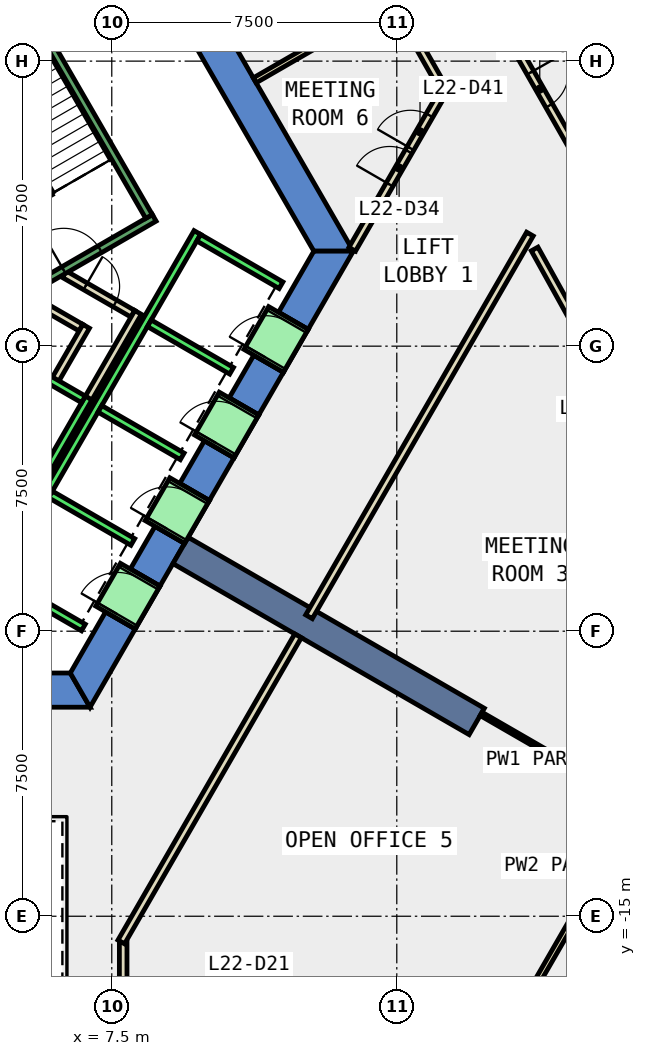
"""IFC4 building model, lengths in metres.
Left out: names, types, materials, properties, quantities, classifications, styles, units other than length and angle.
Written with IfcOpenShell. Run it as: python <this file> out.ifc"""

import sys

from ifc_helpers import new_model, si_unit, direction, frame, frame_2d, origin, place, context, subcontext, project, spatial, polyline, rectangle, outline, extrude, element, fill, save


model = new_model("IFC4")
c1 = context("Model", 3, precision=1e-05, world=origin(), true_north=direction((0.0, 1.0)))
c2 = subcontext(c1, "Body", "Model", "MODEL_VIEW")
j1 = project(units=[si_unit("LENGTHUNIT", "METRE"), si_unit("PLANEANGLEUNIT", "RADIAN")], contexts=[c1])
p1 = place(None, origin())
s1 = spatial("IfcSite", under=j1, at=p1, CompositionType="ELEMENT")
p2 = place(p1, origin())
s2 = spatial("IfcBuilding", under=s1, at=p2, CompositionType="ELEMENT")
p3 = place(p2, frame((0.0, 0.0, 103.4)))
s3 = spatial("IfcBuildingStorey", under=s2, at=p3, CompositionType="ELEMENT", Elevation=103.4)
p4 = place(p3, frame((0.0, 0.0, -0.4)))
e1 = element("IfcWall", 1, at=p4, inside=s3, PredefinedType="SHEAR", context=c2, shape_type="SweptSolid", body=[
    extrude(outline(polyline([(8.517, 11.748), (7.738, 11.298), (12.817, 2.5), (13.856, 2.5), (8.517, 11.748)])), origin(), (0.0, 0.0, 1.0), 4.2),
])
p5 = place(p3, frame((0.0, 0.0, -0.4)))
e2 = element("IfcWall", 2, at=p5, inside=s3, PredefinedType="SHEAR", context=c2, shape_type="SweptSolid", body=[
    extrude(outline(polyline([(5.75, -8.6), (5.75, -9.5), (6.928, -9.5), (6.409, -8.6), (5.75, -8.6)])), origin(), (0.0, 0.0, 1.0), 4.2),
])
p6 = place(p3, frame((0.0, 0.0, -0.4)))
e3 = element("IfcWall", 3, at=p6, inside=s3, PredefinedType="SHEAR", context=c2, shape_type="SweptSolid", body=[
    extrude(outline(polyline([(8.117, -7.44), (7.338, -6.99), (6.409, -8.6), (6.928, -9.5), (8.117, -7.44)])), origin(), (0.0, 0.0, 1.0), 4.2),
])
p7 = place(p3, frame((0.0, 0.0, -0.4)))
e4 = element("IfcWall", 4, at=p7, inside=s3, PredefinedType="SHEAR", context=c2, shape_type="SweptSolid", body=[
    extrude(outline(polyline([(9.417, -5.189), (8.638, -4.739), (7.988, -5.864), (8.767, -6.314), (9.417, -5.189)])), origin(), (0.0, 0.0, 1.0), 4.2),
])
p8 = place(p3, frame((0.0, 0.0, -0.4)))
e5 = element("IfcWall", 5, at=p8, inside=s3, PredefinedType="SHEAR", context=c2, shape_type="SweptSolid", body=[
    extrude(outline(polyline([(10.717, -2.937), (9.938, -2.487), (9.288, -3.613), (10.067, -4.063), (10.717, -2.937)])), origin(), (0.0, 0.0, 1.0), 4.2),
])
p9 = place(p3, frame((0.0, 0.0, -0.4)))
e6 = element("IfcWall", 6, at=p9, inside=s3, PredefinedType="SHEAR", context=c2, shape_type="SweptSolid", body=[
    extrude(outline(polyline([(12.017, -0.686), (11.238, -0.236), (10.588, -1.361), (11.367, -1.811), (12.017, -0.686)])), origin(), (0.0, 0.0, 1.0), 4.2),
])
p10 = place(p3, frame((0.0, 0.0, -0.4)))
e7 = element("IfcWall", 7, at=p10, inside=s3, PredefinedType="SHEAR", context=c2, shape_type="SweptSolid", body=[
    extrude(outline(polyline([(11.888, 0.89), (12.667, 0.44), (13.856, 2.5), (12.817, 2.5), (11.888, 0.89)])), origin(), (0.0, 0.0, 1.0), 4.2),
])
p11 = place(p3, frame((0.0, 0.0, 3.6)))
e8 = element("IfcWall", 8, at=p11, inside=s3, PredefinedType="SHEAR", context=c2, shape_type="SweptSolid", body=[
    extrude(outline(polyline([(8.767, -6.314), (7.988, -5.864), (7.338, -6.99), (8.117, -7.44), (8.767, -6.314)])), origin(), (0.0, 0.0, 1.0), 0.2),
])
p12 = place(p3, frame((0.0, 0.0, 3.6)))
e9 = element("IfcWall", 9, at=p12, inside=s3, PredefinedType="SHEAR", context=c2, shape_type="SweptSolid", body=[
    extrude(outline(polyline([(10.067, -4.063), (9.288, -3.613), (8.638, -4.739), (9.417, -5.189), (10.067, -4.063)])), origin(), (0.0, 0.0, 1.0), 0.2),
])
p13 = place(p3, frame((0.0, 0.0, 3.6)))
e10 = element("IfcWall", 10, at=p13, inside=s3, PredefinedType="SHEAR", context=c2, shape_type="SweptSolid", body=[
    extrude(outline(polyline([(11.367, -1.811), (10.588, -1.361), (9.938, -2.487), (10.717, -2.937), (11.367, -1.811)])), origin(), (0.0, 0.0, 1.0), 0.2),
])
p14 = place(p3, frame((0.0, 0.0, 3.6)))
e11 = element("IfcWall", 11, at=p14, inside=s3, PredefinedType="SHEAR", context=c2, shape_type="SweptSolid", body=[
    extrude(outline(polyline([(12.667, 0.44), (11.888, 0.89), (11.238, -0.236), (12.017, -0.686), (12.667, 0.44)])), origin(), (0.0, 0.0, 1.0), 0.2),
])
p15 = place(p3, frame((9.31, -5.375, -0.4), z_axis=(0.0, 0.0, 1.0), x_axis=(0.866017533419, -0.500013631625, 0.0)))
e12 = element("IfcWall", 12, at=p15, inside=s3, PredefinedType="SHEAR", context=c2, shape_type="SweptSolid", body=[
    extrude(rectangle(XDim=9.0, YDim=0.8, at=frame_2d((4.5, 0.0))), origin(), (0.0, 0.0, 1.0), 4.2),
])
p16 = place(p3, frame((16.195, 6.824, 0.0), z_axis=(0.0, 0.0, 1.0), x_axis=(-0.494984897559, 0.868901577388, 0.0)))
e13 = element("IfcWall", 13, at=p16, inside=s3, PredefinedType="PARTITIONING", context=c2, shape_type="SweptSolid", body=[
    extrude(rectangle(XDim=2.188, YDim=0.2, at=frame_2d((1.094, 0.0))), origin(), (0.0, 0.0, 1.0), 3.8),
])
p17 = place(p3, frame((22.071, -3.65, 0.0), z_axis=(0.0, 0.0, 1.0), x_axis=(-0.485198988697, 0.874403763354, 0.0)))
e14 = element("IfcWall", 14, at=p17, inside=s3, PredefinedType="PARTITIONING", context=c2, shape_type="SweptSolid", body=[
    extrude(rectangle(XDim=7.098, YDim=0.2, at=frame_2d((3.549, 0.0))), origin(), (0.0, 0.0, 1.0), 3.8),
])
p18 = place(p17, frame((3.049, 0.0, 0.0)))
e15 = element("IfcOpeningElement", 15, at=p18, cuts=e14, PredefinedType="OPENING", context=c2, shape_type="SweptSolid", body=[
    extrude(rectangle(XDim=1.0, YDim=2.1, at=frame_2d((0.5, 1.05))), frame((0.0, 0.11, 0.0), z_axis=(0.0, -1.0, 0.0), x_axis=(1.0, 0.0, 0.0)), (0.0, 0.0, 1.0), 0.22),
])
p19 = place(p3, frame((16.98, 9.89, 0.0), z_axis=(0.0, 0.0, 1.0), x_axis=(0.495123170501, -0.868822793228, 0.0)))
e16 = element("IfcWall", 16, at=p19, inside=s3, PredefinedType="PARTITIONING", context=c2, shape_type="SweptSolid", body=[
    extrude(rectangle(XDim=7.198, YDim=0.2, at=frame_2d((3.599, 0.0))), origin(), (0.0, 0.0, 1.0), 3.8),
])
p20 = place(p19, frame((3.099, 0.0, 0.0)))
e17 = element("IfcOpeningElement", 17, at=p20, cuts=e16, PredefinedType="OPENING", context=c2, shape_type="SweptSolid", body=[
    extrude(rectangle(XDim=1.0, YDim=2.1, at=frame_2d((0.5, 1.05))), frame((0.0, 0.11, 0.0), z_axis=(0.0, -1.0, 0.0), x_axis=(1.0, 0.0, 0.0)), (0.0, 0.0, 1.0), 0.22),
])
p21 = place(p3, frame((5.499, 1.172, 0.0), z_axis=(0.0, 0.0, 1.0), x_axis=(0.866333505267, -0.499465972466, 0.0)))
e18 = element("IfcWall", 18, at=p21, inside=s3, PredefinedType="PARTITIONING", context=c2, shape_type="SweptSolid", body=[
    extrude(rectangle(XDim=1.374, YDim=0.2, at=frame_2d((0.687, 0.0))), origin(), (0.0, 0.0, 1.0), 3.8),
])
p22 = place(p3, frame((6.826, 0.522, 0.0), z_axis=(0.0, 0.0, 1.0), x_axis=(-0.500016722714, -0.866015748706, 0.0)))
e19 = element("IfcWall", 19, at=p22, inside=s3, PredefinedType="PARTITIONING", context=c2, shape_type="SweptSolid", body=[
    extrude(rectangle(XDim=1.7, YDim=0.2, at=frame_2d((0.85, 0.0))), origin(), (0.0, 0.0, 1.0), 3.8),
])
p23 = place(p3, frame((6.25, 1.894, 0.0), z_axis=(0.0, 0.0, 1.0), x_axis=(0.866043184279, -0.499969202016, 0.0)))
e20 = element("IfcWall", 20, at=p23, inside=s3, PredefinedType="PARTITIONING", context=c2, shape_type="SweptSolid", body=[
    extrude(rectangle(XDim=2.084, YDim=0.2, at=frame_2d((1.042, 0.0))), origin(), (0.0, 0.0, 1.0), 3.8),
])
p24 = place(p23, frame((0.642, 0.0, 0.0)))
e21 = element("IfcOpeningElement", 21, at=p24, cuts=e20, PredefinedType="OPENING", context=c2, shape_type="SweptSolid", body=[
    extrude(rectangle(XDim=0.9, YDim=2.1, at=frame_2d((0.45, 1.05))), frame((0.0, 0.11, 0.0), z_axis=(0.0, -1.0, 0.0), x_axis=(1.0, 0.0, 0.0)), (0.0, 0.0, 1.0), 0.22),
])
p25 = place(p3, frame((8.192, 0.888, 0.0), z_axis=(0.0, 0.0, 1.0), x_axis=(-0.499940625693, -0.866059680843, 0.0)))
e22 = element("IfcWall", 22, at=p25, inside=s3, PredefinedType="PARTITIONING", context=c2, shape_type="SweptSolid", body=[
    extrude(rectangle(XDim=2.68, YDim=0.2, at=frame_2d((1.34, 0.0))), origin(), (0.0, 0.0, 1.0), 3.8),
])
p26 = place(p3, frame((11.261, 6.994, 0.0), z_axis=(0.0, 0.0, 1.0), x_axis=(0.866037428454, 0.499979172084, 0.0)))
e23 = element("IfcWall", 23, at=p26, inside=s3, PredefinedType="PARTITIONING", context=c2, shape_type="SweptSolid", body=[
    extrude(rectangle(XDim=4.198, YDim=0.15, at=frame_2d((2.099, 0.0))), origin(), (0.0, 0.0, 1.0), 3.8),
])
p27 = place(p3, frame((13.827, 2.55, 0.0), z_axis=(0.0, 0.0, 1.0), x_axis=(0.500070719615, 0.865984569946, 0.0)))
e24 = element("IfcWall", 24, at=p27, inside=s3, PredefinedType="PARTITIONING", context=c2, shape_type="SweptSolid", body=[
    extrude(rectangle(XDim=4.935, YDim=0.2, at=frame_2d((2.468, 0.0))), origin(), (0.0, 0.0, 1.0), 3.8),
])
p28 = place(p27, frame((1.968, 0.0, 0.0)))
e25 = element("IfcOpeningElement", 25, at=p28, cuts=e24, PredefinedType="OPENING", context=c2, shape_type="SweptSolid", body=[
    extrude(rectangle(XDim=1.0, YDim=2.1, at=frame_2d((0.5, 1.05))), frame((0.0, 0.11, 0.0), z_axis=(0.0, -1.0, 0.0), x_axis=(1.0, 0.0, 0.0)), (0.0, 0.0, 1.0), 0.22),
])
p29 = place(p27, frame((3.068, 0.0, 0.0)))
e26 = element("IfcOpeningElement", 26, at=p29, cuts=e24, PredefinedType="OPENING", context=c2, shape_type="SweptSolid", body=[
    extrude(rectangle(XDim=1.0, YDim=2.1, at=frame_2d((0.5, 1.05))), frame((0.0, 0.11, 0.0), z_axis=(0.0, -1.0, 0.0), x_axis=(1.0, 0.0, 0.0)), (0.0, 0.0, 1.0), 0.22),
])
p30 = place(p3, frame((7.8, -15.69, 0.0), z_axis=(0.0, 0.0, 1.0), x_axis=(0.0, -1.0, 0.0)))
e27 = element("IfcWall", 27, at=p30, inside=s3, PredefinedType="PARTITIONING", context=c2, shape_type="SweptSolid", body=[
    extrude(rectangle(XDim=1.7, YDim=0.2, at=frame_2d((0.85, 0.0))), origin(), (0.0, 0.0, 1.0), 3.8),
])
p31 = place(p3, frame((12.401, -7.621, 0.0), z_axis=(0.0, 0.0, 1.0), x_axis=(-0.499983724212, -0.866034800411, 0.0)))
e28 = element("IfcWall", 28, at=p31, inside=s3, PredefinedType="PARTITIONING", context=c2, shape_type="SweptSolid", body=[
    extrude(rectangle(XDim=9.302, YDim=0.2, at=frame_2d((4.651, 0.0))), origin(), (0.0, 0.0, 1.0), 3.8),
])
p32 = place(p3, frame((18.503, 2.949, 0.0), z_axis=(0.0, 0.0, 1.0), x_axis=(-0.49997390151, -0.86604047123, 0.0)))
e29 = element("IfcWall", 29, at=p32, inside=s3, PredefinedType="PARTITIONING", context=c2, shape_type="SweptSolid", body=[
    extrude(rectangle(XDim=11.626, YDim=0.2, at=frame_2d((5.813, 0.0))), origin(), (0.0, 0.0, 1.0), 3.8),
])
p33 = place(p3, frame((17.219, -9.676, 0.0), z_axis=(0.0, 0.0, 1.0), x_axis=(0.86598459596, -0.500070674565, 0.0)))
e30 = element("IfcWall", 30, at=p33, inside=s3, PredefinedType="PARTITIONING", context=c2, shape_type="SweptSolid", body=[
    extrude(rectangle(XDim=4.875, YDim=0.1, at=frame_2d((2.438, 0.0))), origin(), (0.0, 0.0, 1.0), 3.8),
])
p34 = place(p3, frame((21.236, -12.319, 0.0), z_axis=(0.0, 0.0, 1.0), x_axis=(-0.500016488359, -0.866015884017, 0.0)))
e31 = element("IfcWall", 31, at=p34, inside=s3, PredefinedType="PARTITIONING", context=c2, shape_type="SweptSolid", body=[
    extrude(rectangle(XDim=5.702, YDim=0.15, at=frame_2d((2.851, 0.0))), origin(), (0.0, 0.0, 1.0), 3.8),
])
p35 = place(p3, frame((5.492, -3.788, 0.0), z_axis=(0.0, 0.0, 1.0), x_axis=(0.500011755427, 0.866018616679, 0.0)))
e32 = element("IfcWall", 32, at=p35, inside=s3, PredefinedType="STANDARD", context=c2, shape_type="SweptSolid", body=[
    extrude(rectangle(XDim=2.8, YDim=0.2, at=frame_2d((1.4, 0.0))), origin(), (0.0, 0.0, 1.0), 3.8),
])
p36 = place(p3, frame((4.677, -0.2, 0.0), z_axis=(0.0, 0.0, 1.0), x_axis=(0.865973769406, -0.500089422704, 0.0)))
e33 = element("IfcWall", 33, at=p36, inside=s3, PredefinedType="STANDARD", context=c2, shape_type="SweptSolid", body=[
    extrude(rectangle(XDim=2.399, YDim=0.2, at=frame_2d((1.2, 0.0))), origin(), (0.0, 0.0, 1.0), 3.8),
])
p37 = place(p3, frame((4.451, -6.19, 0.0), z_axis=(0.0, 0.0, 1.0), x_axis=(0.50000090737, 0.866024879913, 0.0)))
e34 = element("IfcWall", 34, at=p37, inside=s3, PredefinedType="STANDARD", context=c2, shape_type="SweptSolid", body=[
    extrude(rectangle(XDim=10.6, YDim=0.2, at=frame_2d((5.3, 0.0))), origin(), (0.0, 0.0, 1.0), 3.8),
])
for number, where, z_axis, x_axis in (
    (35, (4.588, -6.153, 0.0), (0.0, 0.0, 1.0), (0.866, -0.5, 0.0)),
    (36, (5.888, -3.902, 0.0), (0.0, 0.0, 1.0), (0.866, -0.5, 0.0)),
    (37, (7.188, -1.65, 0.0), (0.0, 0.0, 1.0), (0.866, -0.5, 0.0)),
    (38, (8.488, 0.602, 0.0), (0.0, 0.0, 1.0), (0.866, -0.5, 0.0)),
):
    element("IfcWall", number, at=place(p3, frame(where, z_axis=z_axis, x_axis=x_axis)), inside=s3, PredefinedType="STANDARD", context=c2, shape_type="SweptSolid", body=[
        extrude(rectangle(XDim=2.5, YDim=0.2, at=frame_2d((1.25, 0.0))), origin(), (0.0, 0.0, 1.0), 3.8),
    ])
p38 = place(p3, frame((9.788, 2.853, 0.0), z_axis=(0.0, 0.0, 1.0), x_axis=(0.865998541277, -0.500046524342, 0.0)))
e39 = element("IfcWall", 39, at=p38, inside=s3, PredefinedType="STANDARD", context=c2, shape_type="SweptSolid", body=[
    extrude(rectangle(XDim=2.5, YDim=0.2, at=frame_2d((1.25, 0.0))), origin(), (0.0, 0.0, 1.0), 3.8),
])
p39 = place(p3, frame((7.598, -7.14, 0.0), z_axis=(0.0, 0.0, 1.0), x_axis=(0.500362116554, 0.865816234728, 0.0)))
e40 = element("IfcWall", 40, at=p39, inside=s3, PredefinedType="STANDARD", context=c2, shape_type="SweptSolid", body=[
    extrude(rectangle(XDim=1.299, YDim=1.2, at=frame_2d((0.65, 0.0))), origin(), (0.0, 0.0, 1.0), 2.4),
])
p40 = place(p39, frame((0.1, 0.0, 0.0)))
e41 = element("IfcOpeningElement", 41, at=p40, cuts=e40, PredefinedType="OPENING", context=c2, shape_type="SweptSolid", body=[
    extrude(rectangle(XDim=1.1, YDim=2.3, at=frame_2d((0.55, 1.15))), frame((0.0, 0.61, 0.0), z_axis=(0.0, -1.0, 0.0), x_axis=(1.0, 0.0, 0.0)), (0.0, 0.0, 1.0), 1.22),
])
p41 = place(p3, frame((8.898, -4.889, 0.0), z_axis=(0.0, 0.0, 1.0), x_axis=(0.500036693733, 0.866004217611, 0.0)))
e42 = element("IfcWall", 42, at=p41, inside=s3, PredefinedType="STANDARD", context=c2, shape_type="SweptSolid", body=[
    extrude(rectangle(XDim=1.3, YDim=1.2, at=frame_2d((0.65, 0.0))), origin(), (0.0, 0.0, 1.0), 2.4),
])
p42 = place(p41, frame((0.1, 0.0, 0.0)))
e43 = element("IfcOpeningElement", 43, at=p42, cuts=e42, PredefinedType="OPENING", context=c2, shape_type="SweptSolid", body=[
    extrude(rectangle(XDim=1.1, YDim=2.3, at=frame_2d((0.55, 1.15))), frame((0.0, 0.61, 0.0), z_axis=(0.0, -1.0, 0.0), x_axis=(1.0, 0.0, 0.0)), (0.0, 0.0, 1.0), 1.22),
])
p43 = place(p3, frame((10.198, -2.637, 0.0), z_axis=(0.0, 0.0, 1.0), x_axis=(0.49989585183, 0.866085525409, 0.0)))
e44 = element("IfcWall", 44, at=p43, inside=s3, PredefinedType="STANDARD", context=c2, shape_type="SweptSolid", body=[
    extrude(rectangle(XDim=1.3, YDim=1.2, at=frame_2d((0.65, 0.0))), origin(), (0.0, 0.0, 1.0), 2.4),
])
p44 = place(p43, frame((0.1, 0.0, 0.0)))
e45 = element("IfcOpeningElement", 45, at=p44, cuts=e44, PredefinedType="OPENING", context=c2, shape_type="SweptSolid", body=[
    extrude(rectangle(XDim=1.1, YDim=2.3, at=frame_2d((0.55, 1.15))), frame((0.0, 0.61, 0.0), z_axis=(0.0, -1.0, 0.0), x_axis=(1.0, 0.0, 0.0)), (0.0, 0.0, 1.0), 1.22),
])
p45 = place(p3, frame((11.498, -0.385, 0.0), z_axis=(0.0, 0.0, 1.0), x_axis=(0.500221244143, 0.865897630733, 0.0)))
e46 = element("IfcWall", 46, at=p45, inside=s3, PredefinedType="STANDARD", context=c2, shape_type="SweptSolid", body=[
    extrude(rectangle(XDim=1.299, YDim=1.2, at=frame_2d((0.65, 0.0))), origin(), (0.0, 0.0, 1.0), 2.4),
])
p46 = place(p45, frame((0.1, 0.0, 0.0)))
e47 = element("IfcOpeningElement", 47, at=p46, cuts=e46, PredefinedType="OPENING", context=c2, shape_type="SweptSolid", body=[
    extrude(rectangle(XDim=1.1, YDim=2.3, at=frame_2d((0.55, 1.15))), frame((0.0, 0.61, 0.0), z_axis=(0.0, -1.0, 0.0), x_axis=(1.0, 0.0, 0.0)), (0.0, 0.0, 1.0), 1.22),
])
p47 = place(p3, frame((4.806, 1.176, 0.0), z_axis=(0.0, 0.0, 1.0), x_axis=(0.866059941101, 0.499940174841, 0.0)))
e48 = element("IfcWall", 48, at=p47, inside=s3, PredefinedType="STANDARD", context=c2, shape_type="SweptSolid", body=[
    extrude(rectangle(XDim=4.4, YDim=0.2, at=frame_2d((2.2, 0.0))), origin(), (0.0, 0.0, 1.0), 3.8),
])
p48 = place(p47, frame((1.65, 0.0, 0.0)))
e49 = element("IfcOpeningElement", 49, at=p48, cuts=e48, PredefinedType="OPENING", context=c2, shape_type="SweptSolid", body=[
    extrude(rectangle(XDim=1.1, YDim=2.2, at=frame_2d((0.55, 1.1))), frame((0.0, 0.11, 0.0), z_axis=(0.0, -1.0, 0.0), x_axis=(1.0, 0.0, 0.0)), (0.0, 0.0, 1.0), 0.22),
])
p49 = place(p3, frame((8.48, 3.412, 0.0), z_axis=(0.0, 0.0, 1.0), x_axis=(-0.499978703459, 0.866037698999, 0.0)))
e50 = element("IfcWall", 50, at=p49, inside=s3, PredefinedType="STANDARD", context=c2, shape_type="SweptSolid", body=[
    extrude(rectangle(XDim=6.9, YDim=0.2, at=frame_2d((3.45, 0.0))), origin(), (0.0, 0.0, 1.0), 3.8),
])
p50 = place(p20, origin())
e51 = element("IfcDoor", 51, at=p50, inside=s3, OperationType="SINGLE_SWING_LEFT", PredefinedType="DOOR", context=c2, shape_type="SweptSolid", body=[
    extrude(rectangle(XDim=1.0, YDim=2.1, at=frame_2d((0.5, 1.05))), frame((0.0, 0.025, 0.0), z_axis=(0.0, -1.0, 0.0), x_axis=(1.0, 0.0, 0.0)), (0.0, 0.0, 1.0), 0.05),
])
fill(e17, e51)
p51 = place(p28, origin())
e52 = element("IfcDoor", 52, at=p51, inside=s3, OperationType="SINGLE_SWING_LEFT", PredefinedType="DOOR", context=c2, shape_type="SweptSolid", body=[
    extrude(rectangle(XDim=1.0, YDim=2.1, at=frame_2d((0.5, 1.05))), frame((0.0, 0.025, 0.0), z_axis=(0.0, -1.0, 0.0), x_axis=(1.0, 0.0, 0.0)), (0.0, 0.0, 1.0), 0.05),
])
fill(e25, e52)
p52 = place(p24, origin())
e53 = element("IfcDoor", 53, at=p52, inside=s3, OperationType="SINGLE_SWING_LEFT", PredefinedType="DOOR", context=c2, shape_type="SweptSolid", body=[
    extrude(rectangle(XDim=0.9, YDim=2.1, at=frame_2d((0.45, 1.05))), frame((0.0, 0.025, 0.0), z_axis=(0.0, -1.0, 0.0), x_axis=(1.0, 0.0, 0.0)), (0.0, 0.0, 1.0), 0.05),
])
fill(e21, e53)
p53 = place(p29, origin())
e54 = element("IfcDoor", 54, at=p53, inside=s3, OperationType="SINGLE_SWING_RIGHT", PredefinedType="DOOR", context=c2, shape_type="SweptSolid", body=[
    extrude(rectangle(XDim=1.0, YDim=2.1, at=frame_2d((0.5, 1.05))), frame((0.0, 0.025, 0.0), z_axis=(0.0, -1.0, 0.0), x_axis=(1.0, 0.0, 0.0)), (0.0, 0.0, 1.0), 0.05),
])
fill(e26, e54)
p54 = place(p40, origin())
e55 = element("IfcDoor", 55, at=p54, inside=s3, OperationType="SLIDING_TO_LEFT", PredefinedType="DOOR", context=c2, shape_type="SweptSolid", body=[
    extrude(rectangle(XDim=1.1, YDim=2.3, at=frame_2d((0.55, 1.15))), frame((0.0, 0.025, 0.0), z_axis=(0.0, -1.0, 0.0), x_axis=(1.0, 0.0, 0.0)), (0.0, 0.0, 1.0), 0.05),
])
fill(e41, e55)
p55 = place(p42, origin())
e56 = element("IfcDoor", 56, at=p55, inside=s3, OperationType="SLIDING_TO_LEFT", PredefinedType="DOOR", context=c2, shape_type="SweptSolid", body=[
    extrude(rectangle(XDim=1.1, YDim=2.3, at=frame_2d((0.55, 1.15))), frame((0.0, 0.025, 0.0), z_axis=(0.0, -1.0, 0.0), x_axis=(1.0, 0.0, 0.0)), (0.0, 0.0, 1.0), 0.05),
])
fill(e43, e56)
p56 = place(p44, origin())
e57 = element("IfcDoor", 57, at=p56, inside=s3, OperationType="SLIDING_TO_LEFT", PredefinedType="DOOR", context=c2, shape_type="SweptSolid", body=[
    extrude(rectangle(XDim=1.1, YDim=2.3, at=frame_2d((0.55, 1.15))), frame((0.0, 0.025, 0.0), z_axis=(0.0, -1.0, 0.0), x_axis=(1.0, 0.0, 0.0)), (0.0, 0.0, 1.0), 0.05),
])
fill(e45, e57)
p57 = place(p46, origin())
e58 = element("IfcDoor", 58, at=p57, inside=s3, OperationType="SLIDING_TO_LEFT", PredefinedType="DOOR", context=c2, shape_type="SweptSolid", body=[
    extrude(rectangle(XDim=1.1, YDim=2.3, at=frame_2d((0.55, 1.15))), frame((0.0, 0.025, 0.0), z_axis=(0.0, -1.0, 0.0), x_axis=(1.0, 0.0, 0.0)), (0.0, 0.0, 1.0), 0.05),
])
fill(e47, e58)
p58 = place(p48, origin())
e59 = element("IfcDoor", 59, at=p58, inside=s3, OperationType="SINGLE_SWING_LEFT", PredefinedType="DOOR", context=c2, shape_type="SweptSolid", body=[
    extrude(rectangle(XDim=1.1, YDim=2.2, at=frame_2d((0.55, 1.1))), frame((0.0, 0.025, 0.0), z_axis=(0.0, -1.0, 0.0), x_axis=(1.0, 0.0, 0.0)), (0.0, 0.0, 1.0), 0.05),
])
fill(e49, e59)
save(model, sys.argv[1])
